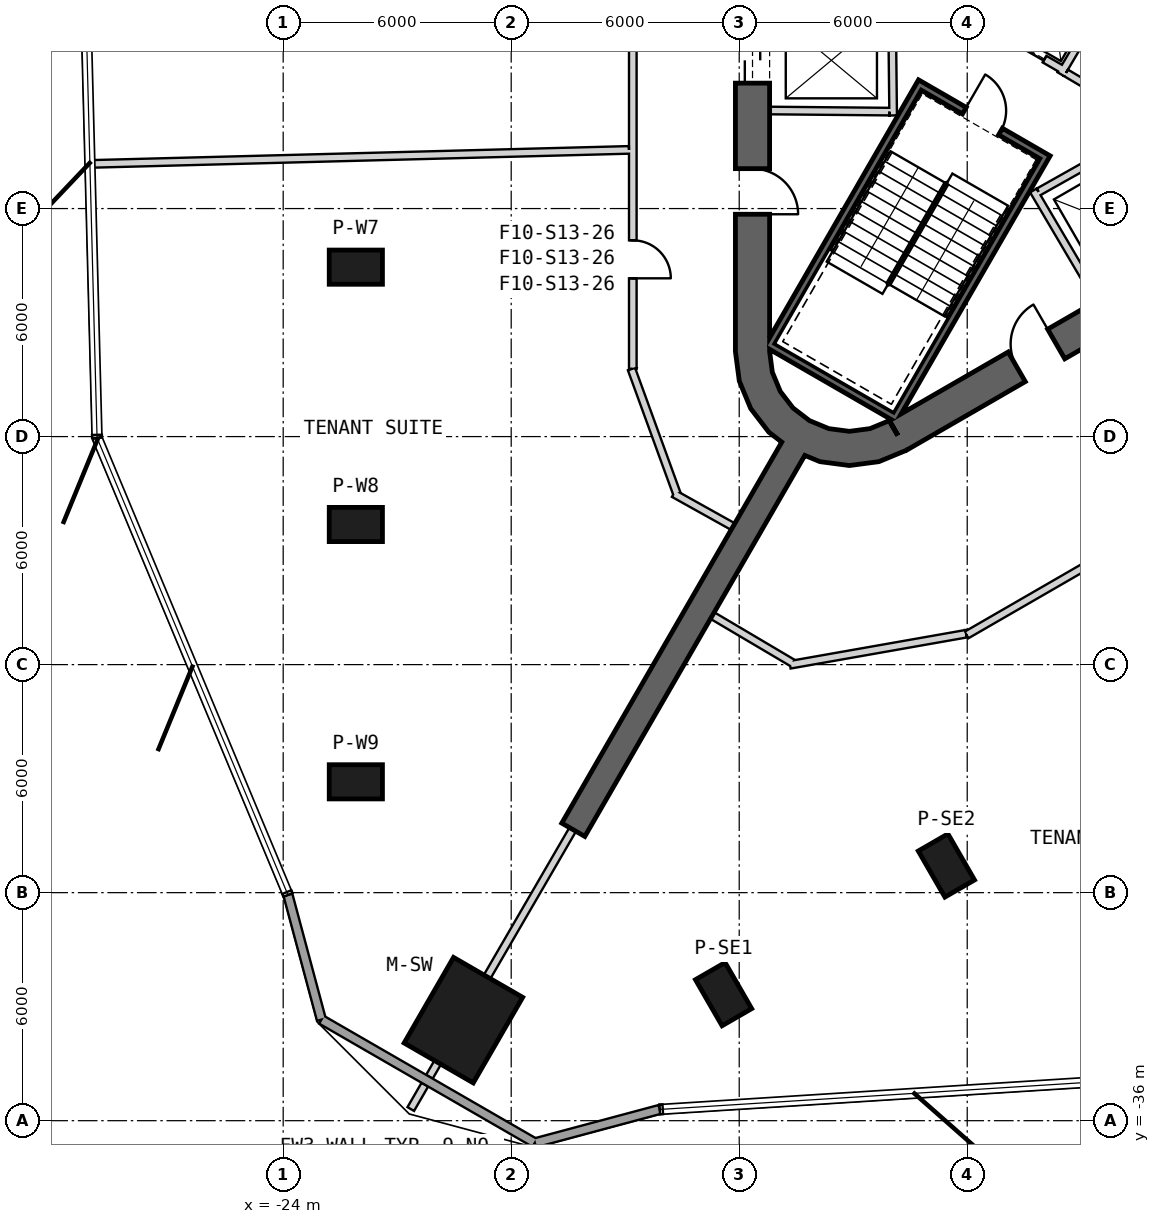
"""IFC4 building model, lengths in metres.
Left out: names, types, materials, properties, quantities, classifications, styles, units other than length and angle.
Written with IfcOpenShell. Run it as: python <this file> out.ifc"""

import sys

from ifc_helpers import new_model, si_unit, direction, frame, frame_2d, origin, origin_2d, place, context, subcontext, project, spatial, polyline, rectangle, outline, extrude, element, fill, save


model = new_model("IFC4")
c1 = context("Model", 3, precision=1e-05, world=origin(), true_north=direction((0.0, 1.0)))
c2 = subcontext(c1, "Body", "Model", "MODEL_VIEW")
j1 = project(units=[si_unit("LENGTHUNIT", "METRE"), si_unit("PLANEANGLEUNIT", "RADIAN")], contexts=[c1])
p1 = place(None, origin())
s1 = spatial("IfcSite", under=j1, at=p1, CompositionType="ELEMENT")
p2 = place(p1, origin())
s2 = spatial("IfcBuilding", under=s1, at=p2, CompositionType="ELEMENT")
p3 = place(p2, frame((0.0, 0.0, 217.2)))
s3 = spatial("IfcBuildingStorey", under=s2, at=p3, CompositionType="ELEMENT", Elevation=217.2)
p4 = place(p3, frame((-19.258, -33.355, 0.0), z_axis=(0.0, 0.0, 1.0), x_axis=(-0.5, -0.866025403784, 0.0)))
e1 = element("IfcColumn", 1, at=p4, inside=s3, PredefinedType="COLUMN", context=c2, shape_type="SweptSolid", body=[
    extrude(rectangle(XDim=2.6, YDim=2.1, at=origin_2d()), origin(), (0.0, 0.0, 1.0), 4.0),
])
for number, where, z_axis, x_axis in (
    (2, (-22.088, -13.542, 0.0), (0.0, 0.0, 1.0), (-1.0, 0.0, 0.0)),
    (3, (-22.088, -20.313, 0.0), (0.0, 0.0, 1.0), (-1.0, 0.0, 0.0)),
    (4, (-22.088, -27.084, 0.0), (0.0, 0.0, 1.0), (-1.0, 0.0, 0.0)),
    (5, (-12.411, -32.671, 0.0), (0.0, 0.0, 1.0), (0.5, -0.866, 0.0)),
    (6, (-6.548, -29.285, 0.0), (0.0, 0.0, 1.0), (0.5, -0.866, 0.0)),
):
    element("IfcColumn", number, at=place(p3, frame(where, z_axis=z_axis, x_axis=x_axis)), inside=s3, PredefinedType="COLUMN", context=c2, shape_type="SweptSolid", body=[
        extrude(rectangle(XDim=1.4, YDim=0.9, at=origin_2d()), origin(), (0.0, 0.0, 1.0), 4.0),
    ])
p5 = place(p3, frame((-11.65, 15.762, 0.0), z_axis=(0.0, 0.0, 1.0), x_axis=(0.0, -1.0, 0.0)))
e7 = element("IfcWall", 7, at=p5, inside=s3, PredefinedType="SHEAR", context=c2, shape_type="SweptSolid", body=[
    extrude(rectangle(XDim=31.523, YDim=0.9, at=frame_2d((15.762, 0.0))), origin(), (0.0, 0.0, 1.0), 4.0),
])
p6 = place(p5, frame((7.062, 0.0, 0.0)))
e8 = element("IfcOpeningElement", 8, at=p6, cuts=e7, PredefinedType="OPENING", context=c2, shape_type="SweptSolid", body=[
    extrude(rectangle(XDim=1.2, YDim=2.4, at=frame_2d((0.6, 1.2))), frame((0.0, 0.46, 0.0), z_axis=(0.0, -1.0, 0.0), x_axis=(1.0, 0.0, 0.0)), (0.0, 0.0, 1.0), 0.92),
])
p7 = place(p5, frame((9.762, 0.0, 0.0)))
e9 = element("IfcOpeningElement", 9, at=p7, cuts=e7, PredefinedType="OPENING", context=c2, shape_type="SweptSolid", body=[
    extrude(rectangle(XDim=1.2, YDim=2.4, at=frame_2d((0.6, 1.2))), frame((0.0, 0.46, 0.0), z_axis=(0.0, -1.0, 0.0), x_axis=(1.0, 0.0, 0.0)), (0.0, 0.0, 1.0), 0.92),
])
p8 = place(p5, frame((12.462, 0.0, 0.0)))
e10 = element("IfcOpeningElement", 10, at=p8, cuts=e7, PredefinedType="OPENING", context=c2, shape_type="SweptSolid", body=[
    extrude(rectangle(XDim=1.2, YDim=2.4, at=frame_2d((0.6, 1.2))), frame((0.0, 0.46, 0.0), z_axis=(0.0, -1.0, 0.0), x_axis=(1.0, 0.0, 0.0)), (0.0, 0.0, 1.0), 0.92),
])
p9 = place(p5, frame((15.162, 0.0, 0.0)))
e11 = element("IfcOpeningElement", 11, at=p9, cuts=e7, PredefinedType="OPENING", context=c2, shape_type="SweptSolid", body=[
    extrude(rectangle(XDim=1.2, YDim=2.4, at=frame_2d((0.6, 1.2))), frame((0.0, 0.46, 0.0), z_axis=(0.0, -1.0, 0.0), x_axis=(1.0, 0.0, 0.0)), (0.0, 0.0, 1.0), 0.92),
])
p10 = place(p5, frame((17.862, 0.0, 0.0)))
e12 = element("IfcOpeningElement", 12, at=p10, cuts=e7, PredefinedType="OPENING", context=c2, shape_type="SweptSolid", body=[
    extrude(rectangle(XDim=1.2, YDim=2.4, at=frame_2d((0.6, 1.2))), frame((0.0, 0.46, 0.0), z_axis=(0.0, -1.0, 0.0), x_axis=(1.0, 0.0, 0.0)), (0.0, 0.0, 1.0), 0.92),
])
p11 = place(p5, frame((20.562, 0.0, 0.0)))
e13 = element("IfcOpeningElement", 13, at=p11, cuts=e7, PredefinedType="OPENING", context=c2, shape_type="SweptSolid", body=[
    extrude(rectangle(XDim=1.2, YDim=2.4, at=frame_2d((0.6, 1.2))), frame((0.0, 0.46, 0.0), z_axis=(0.0, -1.0, 0.0), x_axis=(1.0, 0.0, 0.0)), (0.0, 0.0, 1.0), 0.92),
])
p12 = place(p5, frame((23.262, 0.0, 0.0)))
e14 = element("IfcOpeningElement", 14, at=p12, cuts=e7, PredefinedType="OPENING", context=c2, shape_type="SweptSolid", body=[
    extrude(rectangle(XDim=1.2, YDim=2.4, at=frame_2d((0.6, 1.2))), frame((0.0, 0.46, 0.0), z_axis=(0.0, -1.0, 0.0), x_axis=(1.0, 0.0, 0.0)), (0.0, 0.0, 1.0), 0.92),
])
p13 = place(p5, frame((3.612, 0.0, 0.0)))
e15 = element("IfcOpeningElement", 15, at=p13, cuts=e7, PredefinedType="OPENING", context=c2, shape_type="SweptSolid", body=[
    extrude(rectangle(XDim=1.2, YDim=2.4, at=frame_2d((0.6, 1.2))), frame((0.0, 0.46, 0.0), z_axis=(0.0, -1.0, 0.0), x_axis=(1.0, 0.0, 0.0)), (0.0, 0.0, 1.0), 0.92),
])
p14 = place(p5, frame((26.712, 0.0, 0.0)))
e16 = element("IfcOpeningElement", 16, at=p14, cuts=e7, PredefinedType="OPENING", context=c2, shape_type="SweptSolid", body=[
    extrude(rectangle(XDim=1.2, YDim=2.4, at=frame_2d((0.6, 1.2))), frame((0.0, 0.46, 0.0), z_axis=(0.0, -1.0, 0.0), x_axis=(1.0, 0.0, 0.0)), (0.0, 0.0, 1.0), 0.92),
])
p15 = place(p3, frame((-7.825, -17.97, 0.0), z_axis=(0.0, 0.0, 1.0), x_axis=(0.866028369851, 0.499994862586, 0.0)))
e17 = element("IfcWall", 17, at=p15, inside=s3, PredefinedType="SHEAR", context=c2, shape_type="SweptSolid", body=[
    extrude(rectangle(XDim=31.523, YDim=0.9, at=frame_2d((15.762, 0.0))), origin(), (0.0, 0.0, 1.0), 4.0),
])
p16 = place(p15, frame((7.062, 0.0, 0.0)))
e18 = element("IfcOpeningElement", 18, at=p16, cuts=e17, PredefinedType="OPENING", context=c2, shape_type="SweptSolid", body=[
    extrude(rectangle(XDim=1.2, YDim=2.4, at=frame_2d((0.6, 1.2))), frame((0.0, 0.46, 0.0), z_axis=(0.0, -1.0, 0.0), x_axis=(1.0, 0.0, 0.0)), (0.0, 0.0, 1.0), 0.92),
])
p17 = place(p15, frame((9.762, 0.0, 0.0)))
e19 = element("IfcOpeningElement", 19, at=p17, cuts=e17, PredefinedType="OPENING", context=c2, shape_type="SweptSolid", body=[
    extrude(rectangle(XDim=1.2, YDim=2.4, at=frame_2d((0.6, 1.2))), frame((0.0, 0.46, 0.0), z_axis=(0.0, -1.0, 0.0), x_axis=(1.0, 0.0, 0.0)), (0.0, 0.0, 1.0), 0.92),
])
p18 = place(p15, frame((12.462, 0.0, 0.0)))
e20 = element("IfcOpeningElement", 20, at=p18, cuts=e17, PredefinedType="OPENING", context=c2, shape_type="SweptSolid", body=[
    extrude(rectangle(XDim=1.2, YDim=2.4, at=frame_2d((0.6, 1.2))), frame((0.0, 0.46, 0.0), z_axis=(0.0, -1.0, 0.0), x_axis=(1.0, 0.0, 0.0)), (0.0, 0.0, 1.0), 0.92),
])
p19 = place(p15, frame((15.162, 0.0, 0.0)))
e21 = element("IfcOpeningElement", 21, at=p19, cuts=e17, PredefinedType="OPENING", context=c2, shape_type="SweptSolid", body=[
    extrude(rectangle(XDim=1.2, YDim=2.4, at=frame_2d((0.6, 1.2))), frame((0.0, 0.46, 0.0), z_axis=(0.0, -1.0, 0.0), x_axis=(1.0, 0.0, 0.0)), (0.0, 0.0, 1.0), 0.92),
])
p20 = place(p15, frame((17.862, 0.0, 0.0)))
e22 = element("IfcOpeningElement", 22, at=p20, cuts=e17, PredefinedType="OPENING", context=c2, shape_type="SweptSolid", body=[
    extrude(rectangle(XDim=1.2, YDim=2.4, at=frame_2d((0.6, 1.2))), frame((0.0, 0.46, 0.0), z_axis=(0.0, -1.0, 0.0), x_axis=(1.0, 0.0, 0.0)), (0.0, 0.0, 1.0), 0.92),
])
p21 = place(p15, frame((20.562, 0.0, 0.0)))
e23 = element("IfcOpeningElement", 23, at=p21, cuts=e17, PredefinedType="OPENING", context=c2, shape_type="SweptSolid", body=[
    extrude(rectangle(XDim=1.2, YDim=2.4, at=frame_2d((0.6, 1.2))), frame((0.0, 0.46, 0.0), z_axis=(0.0, -1.0, 0.0), x_axis=(1.0, 0.0, 0.0)), (0.0, 0.0, 1.0), 0.92),
])
p22 = place(p15, frame((26.712, 0.0, 0.0)))
e24 = element("IfcOpeningElement", 24, at=p22, cuts=e17, PredefinedType="OPENING", context=c2, shape_type="SweptSolid", body=[
    extrude(rectangle(XDim=1.2, YDim=2.4, at=frame_2d((0.6, 1.2))), frame((0.0, 0.46, 0.0), z_axis=(0.0, -1.0, 0.0), x_axis=(1.0, 0.0, 0.0)), (0.0, 0.0, 1.0), 0.92),
])
p23 = place(p15, frame((3.612, 0.0, 0.0)))
e25 = element("IfcOpeningElement", 25, at=p23, cuts=e17, PredefinedType="OPENING", context=c2, shape_type="SweptSolid", body=[
    extrude(rectangle(XDim=1.2, YDim=2.4, at=frame_2d((0.6, 1.2))), frame((0.0, 0.46, 0.0), z_axis=(0.0, -1.0, 0.0), x_axis=(1.0, 0.0, 0.0)), (0.0, 0.0, 1.0), 0.92),
])
p24 = place(p3, origin())
e26 = element("IfcWall", 26, at=p24, inside=s3, PredefinedType="SHEAR", context=c2, shape_type="SweptSolid", body=[
    extrude(outline(polyline([(-12.1, -15.762), (-11.998, -16.538), (-11.698, -17.262), (-11.221, -17.883), (-10.6, -18.36), (-9.876, -18.659), (-9.1, -18.762), (-8.323, -18.659), (-7.6, -18.36), (-8.05, -17.58), (-8.556, -17.79), (-9.1, -17.862), (-9.644, -17.79), (-10.15, -17.58), (-10.585, -17.247), (-10.919, -16.812), (-11.128, -16.305), (-11.2, -15.762), (-12.1, -15.762)])), origin(), (0.0, 0.0, 1.0), 4.0),
])
p25 = place(p3, frame((-10.575, -18.316, 0.0), z_axis=(0.0, 0.0, 1.0), x_axis=(-0.499998001389, -0.86602655768, 0.0)))
e27 = element("IfcWall", 27, at=p25, inside=s3, PredefinedType="SHEAR", context=c2, shape_type="SweptSolid", body=[
    extrude(rectangle(XDim=11.581, YDim=0.7, at=frame_2d((5.791, 0.0))), origin(), (0.0, 0.0, 1.0), 4.0),
])
p26 = place(p3, frame((-23.874, -30.059, 0.0), z_axis=(0.0, 0.0, 1.0), x_axis=(0.258798334869, -0.965931375341, 0.0)))
e28 = element("IfcWall", 28, at=p26, inside=s3, PredefinedType="SOLIDWALL", context=c2, shape_type="SweptSolid", body=[
    extrude(rectangle(XDim=3.398, YDim=0.24, at=frame_2d((1.699, 0.0))), origin(), (0.0, 0.0, 1.0), 3.7),
])
p27 = place(p3, frame((-22.995, -33.342, 0.0), z_axis=(0.0, 0.0, 1.0), x_axis=(0.866022628259, -0.50000480732, 0.0)))
e29 = element("IfcWall", 29, at=p27, inside=s3, PredefinedType="SOLIDWALL", context=c2, shape_type="SweptSolid", body=[
    extrude(rectangle(XDim=6.487, YDim=0.24, at=frame_2d((3.243, 0.0))), origin(), (0.0, 0.0, 1.0), 3.7),
])
p28 = place(p3, frame((-17.377, -36.585, 0.0), z_axis=(0.0, 0.0, 1.0), x_axis=(0.96591377161, 0.258864029586, 0.0)))
e30 = element("IfcWall", 30, at=p28, inside=s3, PredefinedType="SOLIDWALL", context=c2, shape_type="SweptSolid", body=[
    extrude(rectangle(XDim=3.402, YDim=0.24, at=frame_2d((1.701, 0.0))), origin(), (0.0, 0.0, 1.0), 3.7),
])
p29 = place(p3, frame((-7.979, -6.85, 0.0), z_axis=(0.0, 0.0, 1.0), x_axis=(0.011121475088, -0.999938154483, 0.0)))
e31 = element("IfcWall", 31, at=p29, inside=s3, PredefinedType="PLUMBINGWALL", context=c2, shape_type="SweptSolid", body=[
    extrude(rectangle(XDim=2.7, YDim=0.2, at=frame_2d((1.35, 0.0))), origin(), (0.0, 0.0, 1.0), 3.7),
])
p30 = place(p3, frame((-8.05, -9.449, 0.0), z_axis=(0.0, 0.0, 1.0), x_axis=(-0.999957467379, 0.009222983926, 0.0)))
e32 = element("IfcWall", 32, at=p30, inside=s3, PredefinedType="PLUMBINGWALL", context=c2, shape_type="SweptSolid", body=[
    extrude(rectangle(XDim=3.15, YDim=0.2, at=frame_2d((1.575, 0.0))), origin(), (0.0, 0.0, 1.0), 3.7),
])
p31 = place(p3, frame((-2.558, -14.409, 0.0), z_axis=(0.0, 0.0, 1.0), x_axis=(-0.507997497166, 0.861358544901, 0.0)))
e33 = element("IfcWall", 33, at=p31, inside=s3, PredefinedType="PLUMBINGWALL", context=c2, shape_type="SweptSolid", body=[
    extrude(rectangle(XDim=3.35, YDim=0.2, at=frame_2d((1.675, 0.0))), origin(), (0.0, 0.0, 1.0), 3.7),
])
p32 = place(p3, frame((-1.769, -10.237, 0.0), z_axis=(0.0, 0.0, 1.0), x_axis=(-0.871534483978, -0.490334215854, 0.0)))
e34 = element("IfcWall", 34, at=p32, inside=s3, PredefinedType="PLUMBINGWALL", context=c2, shape_type="SweptSolid", body=[
    extrude(rectangle(XDim=2.7, YDim=0.2, at=frame_2d((1.35, 0.0))), origin(), (0.0, 0.0, 1.0), 3.7),
])
p33 = place(p3, frame((-3.905, -10.563, -0.3), z_axis=(0.0, 0.0, 1.0), x_axis=(-0.500012932018, -0.866017937352, 0.0)))
e35 = element("IfcWall", 35, at=p33, inside=s3, PredefinedType="SHEAR", context=c2, shape_type="SweptSolid", body=[
    extrude(rectangle(XDim=8.1, YDim=0.2, at=frame_2d((4.05, 0.0))), origin(), (0.0, 0.0, 1.0), 4.0),
])
p34 = place(p3, frame((-11.282, -15.541, -0.3), z_axis=(0.0, 0.0, 1.0), x_axis=(0.866000483506, -0.500043160704, 0.0)))
e36 = element("IfcWall", 36, at=p34, inside=s3, PredefinedType="SHEAR", context=c2, shape_type="SweptSolid", body=[
    extrude(rectangle(XDim=3.8, YDim=0.2, at=frame_2d((1.9, 0.0))), origin(), (0.0, 0.0, 1.0), 4.0),
])
p35 = place(p3, frame((-7.196, -8.663, -0.3), z_axis=(0.0, 0.0, 1.0), x_axis=(-0.499997992926, -0.866026562566, 0.0)))
e37 = element("IfcWall", 37, at=p35, inside=s3, PredefinedType="SHEAR", context=c2, shape_type="SweptSolid", body=[
    extrude(rectangle(XDim=7.9, YDim=0.2, at=frame_2d((3.95, 0.0))), origin(), (0.0, 0.0, 1.0), 4.0),
])
p36 = place(p3, frame((-4.041, -10.599, -0.3), z_axis=(0.0, 0.0, 1.0), x_axis=(-0.866047807691, 0.499961193289, 0.0)))
e38 = element("IfcWall", 38, at=p36, inside=s3, PredefinedType="SHEAR", context=c2, shape_type="SweptSolid", body=[
    extrude(rectangle(XDim=3.6, YDim=0.2, at=frame_2d((1.8, 0.0))), origin(), (0.0, 0.0, 1.0), 4.0),
])
p37 = place(p36, frame((1.25, 0.0, 0.3)))
e39 = element("IfcOpeningElement", 39, at=p37, cuts=e38, PredefinedType="OPENING", context=c2, shape_type="SweptSolid", body=[
    extrude(rectangle(XDim=1.1, YDim=2.1, at=frame_2d((0.55, 1.05))), frame((0.0, 0.11, 0.0), z_axis=(0.0, -1.0, 0.0), x_axis=(1.0, 0.0, 0.0)), (0.0, 0.0, 1.0), 0.22),
])
p38 = place(p3, frame((-3.446, -8.368, 0.0), z_axis=(0.0, 0.0, 1.0), x_axis=(-0.866024647952, 0.500001309137, 0.0)))
e40 = element("IfcWall", 40, at=p38, inside=s3, PredefinedType="PLUMBINGWALL", context=c2, shape_type="SweptSolid", body=[
    extrude(rectangle(XDim=2.4, YDim=0.2, at=frame_2d((1.2, 0.0))), origin(), (0.0, 0.0, 1.0), 3.7),
])
p39 = place(p38, frame((0.6, 0.0, 0.0)))
e41 = element("IfcOpeningElement", 41, at=p39, cuts=e40, PredefinedType="OPENING", context=c2, shape_type="SweptSolid", body=[
    extrude(rectangle(XDim=1.2, YDim=2.4, at=frame_2d((0.6, 1.2))), frame((0.0, 0.11, 0.0), z_axis=(0.0, -1.0, 0.0), x_axis=(1.0, 0.0, 0.0)), (0.0, 0.0, 1.0), 0.22),
])
p40 = place(p3, frame((-2.012, -5.882, 0.0), z_axis=(0.0, 0.0, 1.0), x_axis=(-0.508619639323, -0.860991325447, 0.0)))
e42 = element("IfcWall", 42, at=p40, inside=s3, PredefinedType="PLUMBINGWALL", context=c2, shape_type="SweptSolid", body=[
    extrude(rectangle(XDim=3.0, YDim=0.2, at=frame_2d((1.5, 0.0))), origin(), (0.0, 0.0, 1.0), 3.7),
])
p41 = place(p3, frame((-3.401, -8.43, 0.0), z_axis=(0.0, 0.0, 1.0), x_axis=(0.860598681535, -0.509283721849, 0.0)))
e43 = element("IfcWall", 43, at=p41, inside=s3, PredefinedType="PARTITIONING", context=c2, shape_type="SweptSolid", body=[
    extrude(rectangle(XDim=2.581, YDim=0.2, at=frame_2d((1.291, 0.0))), origin(), (0.0, 0.0, 1.0), 3.7),
])
p42 = place(p41, frame((0.791, 0.0, 0.0)))
e44 = element("IfcOpeningElement", 44, at=p42, cuts=e43, PredefinedType="OPENING", context=c2, shape_type="SweptSolid", body=[
    extrude(rectangle(XDim=1.0, YDim=2.1, at=frame_2d((0.5, 1.05))), frame((0.0, 0.11, 0.0), z_axis=(0.0, -1.0, 0.0), x_axis=(1.0, 0.0, 0.0)), (0.0, 0.0, 1.0), 0.22),
])
p43 = place(p3, frame((-13.722, -19.499, 0.0), z_axis=(0.0, 0.0, 1.0), x_axis=(0.873381780332, -0.487036205824, 0.0)))
e45 = element("IfcWall", 45, at=p43, inside=s3, PredefinedType="PARTITIONING", context=c2, shape_type="SweptSolid", body=[
    extrude(rectangle(XDim=1.785, YDim=0.2, at=frame_2d((0.892, 0.0))), origin(), (0.0, 0.0, 1.0), 3.7),
])
p44 = place(p3, frame((-14.834, -16.223, 0.0), z_axis=(0.0, 0.0, 1.0), x_axis=(0.342017717312, -0.939693503779, 0.0)))
e46 = element("IfcWall", 46, at=p44, inside=s3, PredefinedType="PARTITIONING", context=c2, shape_type="SweptSolid", body=[
    extrude(rectangle(XDim=3.497, YDim=0.2, at=frame_2d((1.749, 0.0))), origin(), (0.0, 0.0, 1.0), 2.78),
])
p45 = place(p3, frame((-14.8, -0.07, 0.0), z_axis=(0.0, 0.0, 1.0), x_axis=(0.0, -1.0, 0.0)))
e47 = element("IfcWall", 47, at=p45, inside=s3, PredefinedType="PARTITIONING", context=c2, shape_type="SweptSolid", body=[
    extrude(rectangle(XDim=16.147, YDim=0.2, at=frame_2d((8.073, 0.0))), origin(), (0.0, 0.0, 1.0), 2.88),
])
p46 = place(p45, frame((12.765, 0.0, 0.0)))
e48 = element("IfcOpeningElement", 48, at=p46, cuts=e47, PredefinedType="OPENING", context=c2, shape_type="SweptSolid", body=[
    extrude(rectangle(XDim=1.0, YDim=2.1, at=frame_2d((0.5, 1.05))), frame((0.0, 0.11, 0.0), z_axis=(0.0, -1.0, 0.0), x_axis=(1.0, 0.0, 0.0)), (0.0, 0.0, 1.0), 0.22),
])
p47 = place(p3, frame((-6.019, -23.22, 0.0), z_axis=(0.0, 0.0, 1.0), x_axis=(0.86602143297, 0.50000687759, 0.0)))
e49 = element("IfcWall", 49, at=p47, inside=s3, PredefinedType="PARTITIONING", context=c2, shape_type="SweptSolid", body=[
    extrude(rectangle(XDim=18.873, YDim=0.2, at=frame_2d((9.437, 0.0))), origin(), (0.0, 0.0, 1.0), 2.88),
])
p48 = place(p3, frame((-10.665, -24.005, 0.0), z_axis=(0.0, 0.0, 1.0), x_axis=(0.984806532296, 0.173655100553, 0.0)))
e50 = element("IfcWall", 50, at=p48, inside=s3, PredefinedType="PARTITIONING", context=c2, shape_type="SweptSolid", body=[
    extrude(rectangle(XDim=4.706, YDim=0.2, at=frame_2d((2.353, 0.0))), origin(), (0.0, 0.0, 1.0), 2.78),
])
p49 = place(p3, frame((-12.707, -22.709, 0.0), z_axis=(0.0, 0.0, 1.0), x_axis=(0.860754387085, -0.509020515415, 0.0)))
e51 = element("IfcWall", 51, at=p49, inside=s3, PredefinedType="PARTITIONING", context=c2, shape_type="SweptSolid", body=[
    extrude(rectangle(XDim=2.457, YDim=0.2, at=frame_2d((1.229, 0.0))), origin(), (0.0, 0.0, 1.0), 3.7),
])
p50 = place(p3, frame((-14.9, -10.456, 0.0), z_axis=(0.0, 0.0, 1.0), x_axis=(-0.999660259834, -0.026064629441, 0.0)))
e52 = element("IfcWall", 52, at=p50, inside=s3, PredefinedType="PARTITIONING", context=c2, shape_type="SweptSolid", body=[
    extrude(rectangle(XDim=14.191, YDim=0.2, at=frame_2d((7.095, 0.0))), origin(), (0.0, 0.0, 1.0), 2.98),
])
p51 = place(p3, frame((-19.934, -34.466, 0.0), z_axis=(0.0, 0.0, 1.0), x_axis=(-0.500286910726, -0.865859692419, 0.0)))
e53 = element("IfcWall", 53, at=p51, inside=s3, PredefinedType="PARTITIONING", context=c2, shape_type="SweptSolid", body=[
    extrude(rectangle(XDim=0.437, YDim=0.2, at=frame_2d((0.218, 0.0))), origin(), (0.0, 0.0, 1.0), 3.7),
])
p52 = place(p3, frame((-20.272, -35.052, 0.0), z_axis=(0.0, 0.0, 1.0), x_axis=(-0.500178781653, -0.865922159541, 0.0)))
e54 = element("IfcWall", 54, at=p52, inside=s3, PredefinedType="PARTITIONING", context=c2, shape_type="SweptSolid", body=[
    extrude(rectangle(XDim=0.741, YDim=0.2, at=frame_2d((0.371, 0.0))), origin(), (0.0, 0.0, 1.0), 3.7),
])
p53 = place(p3, frame((-16.381, -28.337, 0.0), z_axis=(0.0, 0.0, 1.0), x_axis=(-0.502306256161, -0.864689785427, 0.0)))
e55 = element("IfcWall", 55, at=p53, inside=s3, PredefinedType="PARTITIONING", context=c2, shape_type="SweptSolid", body=[
    extrude(rectangle(XDim=4.484, YDim=0.2, at=frame_2d((2.242, 0.0))), origin(), (0.0, 0.0, 1.0), 3.27),
])
p54 = place(p37, origin())
e56 = element("IfcDoor", 56, at=p54, inside=s3, OperationType="SINGLE_SWING_LEFT", PredefinedType="USERDEFINED", context=c2, shape_type="SweptSolid", body=[
    extrude(rectangle(XDim=1.1, YDim=2.1, at=frame_2d((0.55, 1.05))), frame((0.0, 0.025, 0.0), z_axis=(0.0, -1.0, 0.0), x_axis=(1.0, 0.0, 0.0)), (0.0, 0.0, 1.0), 0.05),
])
fill(e39, e56)
p55 = place(p39, origin())
e57 = element("IfcDoor", 57, at=p55, inside=s3, OperationType="SLIDING_TO_LEFT", PredefinedType="USERDEFINED", context=c2, shape_type="SweptSolid", body=[
    extrude(rectangle(XDim=1.2, YDim=2.4, at=frame_2d((0.6, 1.2))), frame((0.0, 0.025, 0.0), z_axis=(0.0, -1.0, 0.0), x_axis=(1.0, 0.0, 0.0)), (0.0, 0.0, 1.0), 0.05),
])
fill(e41, e57)
p56 = place(p46, origin())
e58 = element("IfcDoor", 58, at=p56, inside=s3, OperationType="SINGLE_SWING_LEFT", PredefinedType="USERDEFINED", context=c2, shape_type="SweptSolid", body=[
    extrude(rectangle(XDim=1.0, YDim=2.1, at=frame_2d((0.5, 1.05))), frame((0.0, 0.025, 0.0), z_axis=(0.0, -1.0, 0.0), x_axis=(1.0, 0.0, 0.0)), (0.0, 0.0, 1.0), 0.05),
])
fill(e48, e58)
p57 = place(p12, origin())
e59 = element("IfcDoor", 59, at=p57, inside=s3, OperationType="SLIDING_TO_LEFT", PredefinedType="USERDEFINED", context=c2, shape_type="SweptSolid", body=[
    extrude(rectangle(XDim=1.2, YDim=2.4, at=frame_2d((0.6, 1.2))), frame((0.0, 0.025, 0.0), z_axis=(0.0, -1.0, 0.0), x_axis=(1.0, 0.0, 0.0)), (0.0, 0.0, 1.0), 0.05),
])
fill(e14, e59)
p58 = place(p14, origin())
e60 = element("IfcDoor", 60, at=p58, inside=s3, OperationType="SINGLE_SWING_LEFT", PredefinedType="USERDEFINED", context=c2, shape_type="SweptSolid", body=[
    extrude(rectangle(XDim=1.2, YDim=2.4, at=frame_2d((0.6, 1.2))), frame((0.0, 0.025, 0.0), z_axis=(0.0, -1.0, 0.0), x_axis=(1.0, 0.0, 0.0)), (0.0, 0.0, 1.0), 0.05),
])
fill(e16, e60)
p59 = place(p23, origin())
e61 = element("IfcDoor", 61, at=p59, inside=s3, OperationType="SINGLE_SWING_LEFT", PredefinedType="USERDEFINED", context=c2, shape_type="SweptSolid", body=[
    extrude(rectangle(XDim=1.2, YDim=2.4, at=frame_2d((0.6, 1.2))), frame((0.0, 0.025, 0.0), z_axis=(0.0, -1.0, 0.0), x_axis=(1.0, 0.0, 0.0)), (0.0, 0.0, 1.0), 0.05),
])
fill(e25, e61)
save(model, sys.argv[1])
